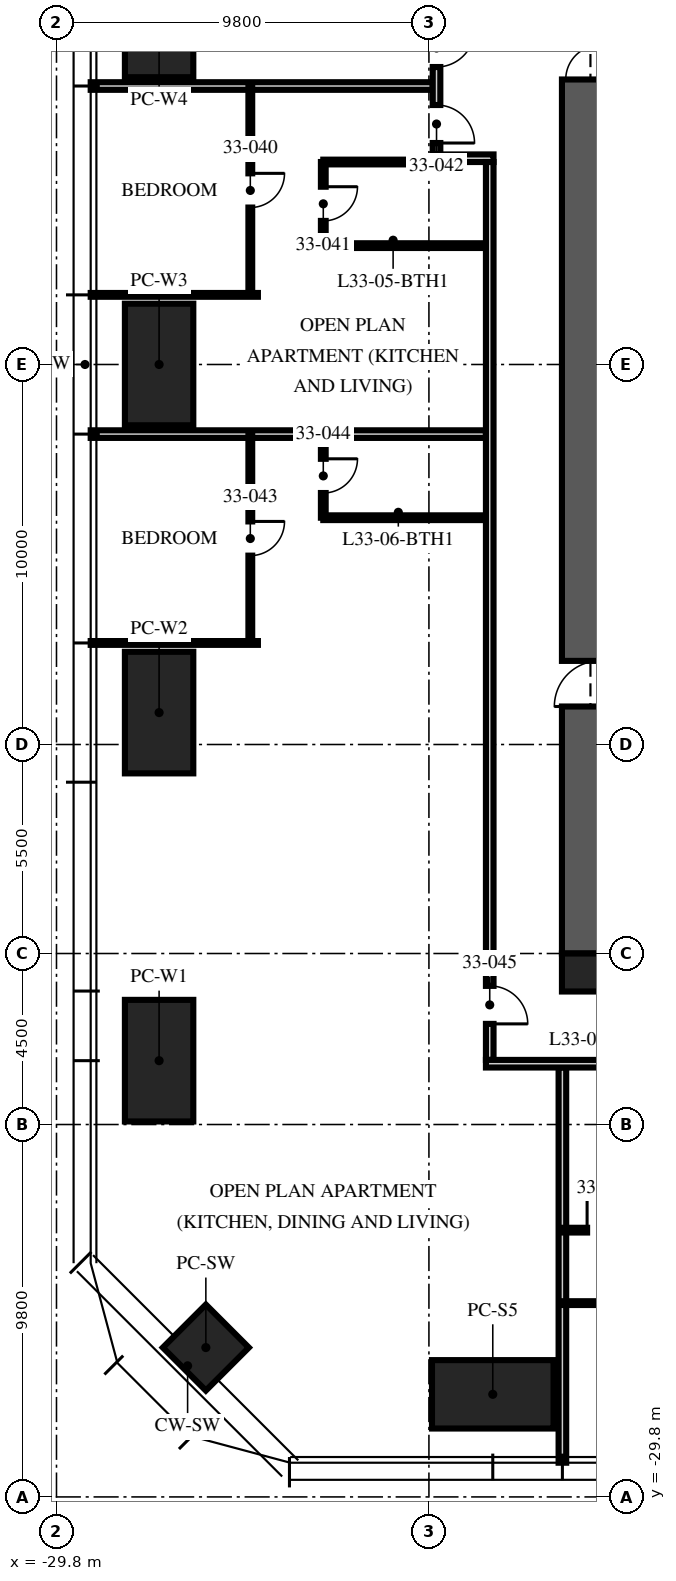
"""IFC4 building model, lengths in metres.
Left out: names, types, materials, properties, quantities, classifications, styles, units other than length and angle.
Written with IfcOpenShell. Run it as: python <this file> out.ifc"""

import sys

from ifc_helpers import new_model, si_unit, direction, frame, frame_2d, origin, origin_2d, place, context, subcontext, project, spatial, rectangle, extrude, element, fill, save


model = new_model("IFC4")
c1 = context("Model", 3, precision=1e-05, world=origin(), true_north=direction((0.0, 1.0)))
c2 = subcontext(c1, "Body", "Model", "MODEL_VIEW")
j1 = project(units=[si_unit("LENGTHUNIT", "METRE"), si_unit("PLANEANGLEUNIT", "RADIAN")], contexts=[c1])
p1 = place(None, origin())
s1 = spatial("IfcSite", under=j1, at=p1, CompositionType="ELEMENT")
p2 = place(p1, origin())
s2 = spatial("IfcBuilding", under=s1, at=p2, CompositionType="ELEMENT")
p3 = place(p2, frame((0.0, 0.0, 133.5)))
s3 = spatial("IfcBuildingStorey", under=s2, at=p3, CompositionType="ELEMENT", Elevation=133.5)
p4 = place(p3, frame((-15.5, -15.5, -0.25), z_axis=(0.0, 0.0, 1.0), x_axis=(0.0, 1.0, 0.0)))
e1 = element("IfcWall", 1, at=p4, inside=s3, PredefinedType="SHEAR", context=c2, shape_type="SweptSolid", body=[
    extrude(rectangle(XDim=31.0, YDim=2.0, at=frame_2d((15.5, 0.0))), origin(), (0.0, 0.0, 1.0), 3.75),
])
p5 = place(p4, frame((6.5, 0.0, 0.25)))
e2 = element("IfcOpeningElement", 2, at=p5, cuts=e1, PredefinedType="OPENING", context=c2, shape_type="SweptSolid", body=[
    extrude(rectangle(XDim=1.2, YDim=2.1, at=frame_2d((0.6, 1.05))), frame((0.0, 1.01, 0.0), z_axis=(0.0, -1.0, 0.0), x_axis=(1.0, 0.0, 0.0)), (0.0, 0.0, 1.0), 2.02),
])
p6 = place(p4, frame((23.0, 0.0, 0.25)))
e3 = element("IfcOpeningElement", 3, at=p6, cuts=e1, PredefinedType="OPENING", context=c2, shape_type="SweptSolid", body=[
    extrude(rectangle(XDim=1.8, YDim=2.1, at=frame_2d((0.9, 1.05))), frame((0.0, 1.01, 0.0), z_axis=(0.0, -1.0, 0.0), x_axis=(1.0, 0.0, 0.0)), (0.0, 0.0, 1.0), 2.02),
])
p7 = place(p3, frame((-16.0, -16.0, -0.25), z_axis=(0.0, 0.0, 1.0), x_axis=(1.0, 0.0, 0.0)))
e4 = element("IfcColumn", 4, at=p7, inside=s3, PredefinedType="COLUMN", context=c2, shape_type="SweptSolid", body=[
    extrude(rectangle(XDim=1.0, YDim=1.0, at=origin_2d()), origin(), (0.0, 0.0, 1.0), 3.75),
])
for number, where, z_axis, x_axis in (
    (5, (-18.32, -27.1, 0.0), (0.0, 0.0, 1.0), (1.0, 0.0, 0.0)),
    (6, (-27.1, -18.32, 0.0), (0.0, 0.0, 1.0), (0.0, 1.0, 0.0)),
    (7, (-27.1, -9.16, 0.0), (0.0, 0.0, 1.0), (0.0, 1.0, 0.0)),
    (8, (-27.1, 0.0, 0.0), (0.0, 0.0, 1.0), (0.0, 1.0, 0.0)),
    (9, (-27.1, 9.16, 0.0), (0.0, 0.0, 1.0), (0.0, 1.0, 0.0)),
):
    element("IfcColumn", number, at=place(p3, frame(where, z_axis=z_axis, x_axis=x_axis)), inside=s3, PredefinedType="COLUMN", context=c2, shape_type="SweptSolid", body=[
        extrude(rectangle(XDim=3.2, YDim=1.8, at=origin_2d()), origin(), (0.0, 0.0, 1.0), 3.75),
    ])
p8 = place(p3, frame((-25.87, -25.87, 0.0), z_axis=(0.0, 0.0, 1.0), x_axis=(0.707106781187, -0.707106781187, 0.0)))
e10 = element("IfcColumn", 10, at=p8, inside=s3, PredefinedType="COLUMN", context=c2, shape_type="SweptSolid", body=[
    extrude(rectangle(XDim=1.6, YDim=1.6, at=origin_2d()), origin(), (0.0, 0.0, 1.0), 3.75),
])
p9 = place(p3, frame((-19.9, 7.328, 0.0), z_axis=(0.0, 0.0, 1.0), x_axis=(-1.0, 0.0, 0.0)))
e11 = element("IfcWall", 11, at=p9, inside=s3, PredefinedType="PARTITIONING", context=c2, shape_type="SweptSolid", body=[
    extrude(rectangle(XDim=9.0, YDim=0.2, at=frame_2d((4.5, 0.0))), origin(), (0.0, 0.0, 1.0), 2.81),
])
p10 = place(p3, frame((-24.5, 1.832, 0.0), z_axis=(0.0, 0.0, 1.0), x_axis=(-1.0, 0.0, 0.0)))
e12 = element("IfcWall", 12, at=p10, inside=s3, PredefinedType="PARTITIONING", context=c2, shape_type="SweptSolid", body=[
    extrude(rectangle(XDim=4.4, YDim=0.1, at=frame_2d((2.2, 0.0))), origin(), (0.0, 0.0, 1.0), 2.81),
])
p11 = place(p3, frame((-18.5, -1.832, 0.0), z_axis=(0.0, 0.0, 1.0), x_axis=(-1.0, 0.0, 0.0)))
e13 = element("IfcWall", 13, at=p11, inside=s3, PredefinedType="PARTITIONING", context=c2, shape_type="SweptSolid", body=[
    extrude(rectangle(XDim=10.4, YDim=0.2, at=frame_2d((5.2, 0.0))), origin(), (0.0, 0.0, 1.0), 2.81),
])
p12 = place(p3, frame((-24.5, -7.328, 0.0), z_axis=(0.0, 0.0, 1.0), x_axis=(-1.0, 0.0, 0.0)))
e14 = element("IfcWall", 14, at=p12, inside=s3, PredefinedType="PARTITIONING", context=c2, shape_type="SweptSolid", body=[
    extrude(rectangle(XDim=4.4, YDim=0.1, at=frame_2d((2.2, 0.0))), origin(), (0.0, 0.0, 1.0), 2.81),
])
p13 = place(p3, frame((-16.488, -18.5, 0.0), z_axis=(0.0, 0.0, 1.0), x_axis=(0.0, -1.0, 0.0)))
e15 = element("IfcWall", 15, at=p13, inside=s3, PredefinedType="PARTITIONING", context=c2, shape_type="SweptSolid", body=[
    extrude(rectangle(XDim=10.4, YDim=0.2, at=frame_2d((5.2, 0.0))), origin(), (0.0, 0.0, 1.0), 2.81),
])
p14 = place(p3, frame((-24.7, 7.328, 0.0), z_axis=(0.0, 0.0, 1.0), x_axis=(0.0, -1.0, 0.0)))
e16 = element("IfcWall", 16, at=p14, inside=s3, PredefinedType="PARTITIONING", context=c2, shape_type="SweptSolid", body=[
    extrude(rectangle(XDim=5.496, YDim=0.1, at=frame_2d((2.748, 0.0))), origin(), (0.0, 0.0, 1.0), 2.81),
])
p15 = place(p14, frame((2.298, 0.0, 0.0)))
e17 = element("IfcOpeningElement", 17, at=p15, cuts=e16, PredefinedType="OPENING", context=c2, shape_type="SweptSolid", body=[
    extrude(rectangle(XDim=0.9, YDim=2.1, at=frame_2d((0.45, 1.05))), frame((0.0, 0.06, 0.0), z_axis=(0.0, -1.0, 0.0), x_axis=(1.0, 0.0, 0.0)), (0.0, 0.0, 1.0), 0.12),
])
p16 = place(p3, frame((-22.78, 5.328, 0.0), z_axis=(0.0, 0.0, 1.0), x_axis=(0.0, -1.0, 0.0)))
e18 = element("IfcWall", 18, at=p16, inside=s3, PredefinedType="PARTITIONING", context=c2, shape_type="SweptSolid", body=[
    extrude(rectangle(XDim=2.2, YDim=0.125, at=frame_2d((1.1, 0.0))), origin(), (0.0, 0.0, 1.0), 2.81),
])
p17 = place(p16, frame((0.65, 0.0, 0.0)))
e19 = element("IfcOpeningElement", 19, at=p17, cuts=e18, PredefinedType="OPENING", context=c2, shape_type="SweptSolid", body=[
    extrude(rectangle(XDim=0.9, YDim=2.1, at=frame_2d((0.45, 1.05))), frame((0.0, 0.073, 0.0), z_axis=(0.0, -1.0, 0.0), x_axis=(1.0, 0.0, 0.0)), (0.0, 0.0, 1.0), 0.145),
])
p18 = place(p3, frame((-19.97, 5.328, 0.0), z_axis=(0.0, 0.0, 1.0), x_axis=(-1.0, 0.0, 0.0)))
e20 = element("IfcWall", 20, at=p18, inside=s3, PredefinedType="PARTITIONING", context=c2, shape_type="SweptSolid", body=[
    extrude(rectangle(XDim=2.81, YDim=0.125, at=frame_2d((1.405, 0.0))), origin(), (0.0, 0.0, 1.0), 3.5),
])
p19 = place(p3, frame((-18.5, 3.128, 0.0), z_axis=(0.0, 0.0, 1.0), x_axis=(-1.0, 0.0, 0.0)))
e21 = element("IfcWall", 21, at=p19, inside=s3, PredefinedType="PARTITIONING", context=c2, shape_type="SweptSolid", body=[
    extrude(rectangle(XDim=4.28, YDim=0.125, at=frame_2d((2.14, 0.0))), origin(), (0.0, 0.0, 1.0), 3.5),
])
p20 = place(p3, frame((-24.7, -1.832, 0.0), z_axis=(0.0, 0.0, 1.0), x_axis=(0.0, -1.0, 0.0)))
e22 = element("IfcWall", 22, at=p20, inside=s3, PredefinedType="PARTITIONING", context=c2, shape_type="SweptSolid", body=[
    extrude(rectangle(XDim=5.496, YDim=0.1, at=frame_2d((2.748, 0.0))), origin(), (0.0, 0.0, 1.0), 2.81),
])
p21 = place(p20, frame((2.298, 0.0, 0.0)))
e23 = element("IfcOpeningElement", 23, at=p21, cuts=e22, PredefinedType="OPENING", context=c2, shape_type="SweptSolid", body=[
    extrude(rectangle(XDim=0.9, YDim=2.1, at=frame_2d((0.45, 1.05))), frame((0.0, 0.06, 0.0), z_axis=(0.0, -1.0, 0.0), x_axis=(1.0, 0.0, 0.0)), (0.0, 0.0, 1.0), 0.12),
])
p22 = place(p3, frame((-22.78, -1.832, 0.0), z_axis=(0.0, 0.0, 1.0), x_axis=(0.0, -1.0, 0.0)))
e24 = element("IfcWall", 24, at=p22, inside=s3, PredefinedType="PARTITIONING", context=c2, shape_type="SweptSolid", body=[
    extrude(rectangle(XDim=2.2, YDim=0.125, at=frame_2d((1.1, 0.0))), origin(), (0.0, 0.0, 1.0), 3.5),
])
p23 = place(p22, frame((0.65, 0.0, 0.0)))
e25 = element("IfcOpeningElement", 25, at=p23, cuts=e24, PredefinedType="OPENING", context=c2, shape_type="SweptSolid", body=[
    extrude(rectangle(XDim=0.9, YDim=2.1, at=frame_2d((0.45, 1.05))), frame((0.0, 0.073, 0.0), z_axis=(0.0, -1.0, 0.0), x_axis=(1.0, 0.0, 0.0)), (0.0, 0.0, 1.0), 0.145),
])
p24 = place(p3, frame((-18.5, -4.032, 0.0), z_axis=(0.0, 0.0, 1.0), x_axis=(-1.0, 0.0, 0.0)))
e26 = element("IfcWall", 26, at=p24, inside=s3, PredefinedType="PARTITIONING", context=c2, shape_type="SweptSolid", body=[
    extrude(rectangle(XDim=4.28, YDim=0.125, at=frame_2d((2.14, 0.0))), origin(), (0.0, 0.0, 1.0), 3.5),
])
p25 = place(p3, frame((-16.488, -24.7, 0.0), z_axis=(0.0, 0.0, 1.0), x_axis=(1.0, 0.0, 0.0)))
e27 = element("IfcWall", 27, at=p25, inside=s3, PredefinedType="PARTITIONING", context=c2, shape_type="SweptSolid", body=[
    extrude(rectangle(XDim=5.496, YDim=0.1, at=frame_2d((2.748, 0.0))), origin(), (0.0, 0.0, 1.0), 2.81),
])
p26 = place(p25, frame((2.298, 0.0, 0.0)))
e28 = element("IfcOpeningElement", 28, at=p26, cuts=e27, PredefinedType="OPENING", context=c2, shape_type="SweptSolid", body=[
    extrude(rectangle(XDim=0.9, YDim=2.1, at=frame_2d((0.45, 1.05))), frame((0.0, 0.06, 0.0), z_axis=(0.0, -1.0, 0.0), x_axis=(1.0, 0.0, 0.0)), (0.0, 0.0, 1.0), 0.12),
])
p27 = place(p3, frame((-16.488, -22.78, 0.0), z_axis=(0.0, 0.0, 1.0), x_axis=(1.0, 0.0, 0.0)))
e29 = element("IfcWall", 29, at=p27, inside=s3, PredefinedType="PARTITIONING", context=c2, shape_type="SweptSolid", body=[
    extrude(rectangle(XDim=2.2, YDim=0.125, at=frame_2d((1.1, 0.0))), origin(), (0.0, 0.0, 1.0), 3.5),
])
p28 = place(p27, frame((0.65, 0.0, 0.0)))
e30 = element("IfcOpeningElement", 30, at=p28, cuts=e29, PredefinedType="OPENING", context=c2, shape_type="SweptSolid", body=[
    extrude(rectangle(XDim=0.9, YDim=2.1, at=frame_2d((0.45, 1.05))), frame((0.0, 0.073, 0.0), z_axis=(0.0, -1.0, 0.0), x_axis=(1.0, 0.0, 0.0)), (0.0, 0.0, 1.0), 0.145),
])
p29 = place(p3, frame((-18.3, 5.428, 0.0), z_axis=(0.0, 0.0, 1.0), x_axis=(-1.0, 0.0, 0.0)))
e31 = element("IfcWall", 31, at=p29, inside=s3, PredefinedType="PARTITIONING", context=c2, shape_type="SweptSolid", body=[
    extrude(rectangle(XDim=1.6, YDim=0.2, at=frame_2d((0.8, 0.0))), origin(), (0.0, 0.0, 1.0), 3.5),
])
p30 = place(p3, frame((-19.8, 9.128, 0.0), z_axis=(0.0, 0.0, 1.0), x_axis=(0.0, -1.0, 0.0)))
e32 = element("IfcWall", 32, at=p30, inside=s3, PredefinedType="PARTITIONING", context=c2, shape_type="SweptSolid", body=[
    extrude(rectangle(XDim=3.6, YDim=0.2, at=frame_2d((1.8, 0.0))), origin(), (0.0, 0.0, 1.0), 2.7),
])
p31 = place(p30, frame((0.3, 0.0, 0.0)))
e33 = element("IfcOpeningElement", 33, at=p31, cuts=e32, PredefinedType="OPENING", context=c2, shape_type="SweptSolid", body=[
    extrude(rectangle(XDim=1.0, YDim=2.2, at=frame_2d((0.5, 1.1))), frame((0.0, 0.11, 0.0), z_axis=(0.0, -1.0, 0.0), x_axis=(1.0, 0.0, 0.0)), (0.0, 0.0, 1.0), 0.22),
])
p32 = place(p30, frame((2.3, 0.0, 0.0)))
e34 = element("IfcOpeningElement", 34, at=p32, cuts=e32, PredefinedType="OPENING", context=c2, shape_type="SweptSolid", body=[
    extrude(rectangle(XDim=1.0, YDim=2.2, at=frame_2d((0.5, 1.1))), frame((0.0, 0.11, 0.0), z_axis=(0.0, -1.0, 0.0), x_axis=(1.0, 0.0, 0.0)), (0.0, 0.0, 1.0), 0.22),
])
p33 = place(p3, frame((-18.4, 5.328, 0.0), z_axis=(0.0, 0.0, 1.0), x_axis=(0.0, -1.0, 0.0)))
e35 = element("IfcWall", 35, at=p33, inside=s3, PredefinedType="PARTITIONING", context=c2, shape_type="SweptSolid", body=[
    extrude(rectangle(XDim=23.628, YDim=0.2, at=frame_2d((11.814, 0.0))), origin(), (0.0, 0.0, 1.0), 2.3),
])
p34 = place(p33, frame((21.68, 0.0, 0.0)))
e36 = element("IfcOpeningElement", 36, at=p34, cuts=e35, PredefinedType="OPENING", context=c2, shape_type="SweptSolid", body=[
    extrude(rectangle(XDim=1.0, YDim=2.2, at=frame_2d((0.5, 1.1))), frame((0.0, 0.11, 0.0), z_axis=(0.0, -1.0, 0.0), x_axis=(1.0, 0.0, 0.0)), (0.0, 0.0, 1.0), 0.22),
])
p35 = place(p3, frame((-8.6, -18.4, 0.0), z_axis=(0.0, 0.0, 1.0), x_axis=(-1.0, 0.0, 0.0)))
e37 = element("IfcWall", 37, at=p35, inside=s3, PredefinedType="PARTITIONING", context=c2, shape_type="SweptSolid", body=[
    extrude(rectangle(XDim=9.9, YDim=0.2, at=frame_2d((4.95, 0.0))), origin(), (0.0, 0.0, 1.0), 2.3),
])
p36 = place(p35, frame((0.868, 0.0, 0.0)))
e38 = element("IfcOpeningElement", 38, at=p36, cuts=e37, PredefinedType="OPENING", context=c2, shape_type="SweptSolid", body=[
    extrude(rectangle(XDim=1.0, YDim=2.2, at=frame_2d((0.5, 1.1))), frame((0.0, 0.11, 0.0), z_axis=(0.0, -1.0, 0.0), x_axis=(1.0, 0.0, 0.0)), (0.0, 0.0, 1.0), 0.22),
])
p37 = place(p31, origin())
e39 = element("IfcDoor", 39, at=p37, inside=s3, OperationType="SINGLE_SWING_LEFT", PredefinedType="DOOR", context=c2, shape_type="SweptSolid", body=[
    extrude(rectangle(XDim=1.0, YDim=2.2, at=frame_2d((0.5, 1.1))), frame((0.0, 0.025, 0.0), z_axis=(0.0, -1.0, 0.0), x_axis=(1.0, 0.0, 0.0)), (0.0, 0.0, 1.0), 0.05),
])
fill(e33, e39)
p38 = place(p15, origin())
e40 = element("IfcDoor", 40, at=p38, inside=s3, OperationType="SINGLE_SWING_LEFT", PredefinedType="DOOR", context=c2, shape_type="SweptSolid", body=[
    extrude(rectangle(XDim=0.9, YDim=2.1, at=frame_2d((0.45, 1.05))), frame((0.0, 0.025, 0.0), z_axis=(0.0, -1.0, 0.0), x_axis=(1.0, 0.0, 0.0)), (0.0, 0.0, 1.0), 0.05),
])
fill(e17, e40)
p39 = place(p17, origin())
e41 = element("IfcDoor", 41, at=p39, inside=s3, OperationType="SINGLE_SWING_LEFT", PredefinedType="DOOR", context=c2, shape_type="SweptSolid", body=[
    extrude(rectangle(XDim=0.9, YDim=2.1, at=frame_2d((0.45, 1.05))), frame((0.0, 0.025, 0.0), z_axis=(0.0, -1.0, 0.0), x_axis=(1.0, 0.0, 0.0)), (0.0, 0.0, 1.0), 0.05),
])
fill(e19, e41)
p40 = place(p32, origin())
e42 = element("IfcDoor", 42, at=p40, inside=s3, OperationType="SINGLE_SWING_RIGHT", PredefinedType="DOOR", context=c2, shape_type="SweptSolid", body=[
    extrude(rectangle(XDim=1.0, YDim=2.2, at=frame_2d((0.5, 1.1))), frame((0.0, 0.025, 0.0), z_axis=(0.0, -1.0, 0.0), x_axis=(1.0, 0.0, 0.0)), (0.0, 0.0, 1.0), 0.05),
])
fill(e34, e42)
p41 = place(p21, origin())
e43 = element("IfcDoor", 43, at=p41, inside=s3, OperationType="SINGLE_SWING_LEFT", PredefinedType="DOOR", context=c2, shape_type="SweptSolid", body=[
    extrude(rectangle(XDim=0.9, YDim=2.1, at=frame_2d((0.45, 1.05))), frame((0.0, 0.025, 0.0), z_axis=(0.0, -1.0, 0.0), x_axis=(1.0, 0.0, 0.0)), (0.0, 0.0, 1.0), 0.05),
])
fill(e23, e43)
p42 = place(p23, origin())
e44 = element("IfcDoor", 44, at=p42, inside=s3, OperationType="SINGLE_SWING_LEFT", PredefinedType="DOOR", context=c2, shape_type="SweptSolid", body=[
    extrude(rectangle(XDim=0.9, YDim=2.1, at=frame_2d((0.45, 1.05))), frame((0.0, 0.025, 0.0), z_axis=(0.0, -1.0, 0.0), x_axis=(1.0, 0.0, 0.0)), (0.0, 0.0, 1.0), 0.05),
])
fill(e25, e44)
p43 = place(p34, origin())
e45 = element("IfcDoor", 45, at=p43, inside=s3, OperationType="SINGLE_SWING_RIGHT", PredefinedType="DOOR", context=c2, shape_type="SweptSolid", body=[
    extrude(rectangle(XDim=1.0, YDim=2.2, at=frame_2d((0.5, 1.1))), frame((0.0, 0.025, 0.0), z_axis=(0.0, -1.0, 0.0), x_axis=(1.0, 0.0, 0.0)), (0.0, 0.0, 1.0), 0.05),
])
fill(e36, e45)
p44 = place(p28, origin())
e46 = element("IfcDoor", 46, at=p44, inside=s3, OperationType="SINGLE_SWING_LEFT", PredefinedType="DOOR", context=c2, shape_type="SweptSolid", body=[
    extrude(rectangle(XDim=0.9, YDim=2.1, at=frame_2d((0.45, 1.05))), frame((0.0, 0.025, 0.0), z_axis=(0.0, -1.0, 0.0), x_axis=(1.0, 0.0, 0.0)), (0.0, 0.0, 1.0), 0.05),
])
fill(e30, e46)
save(model, sys.argv[1])
